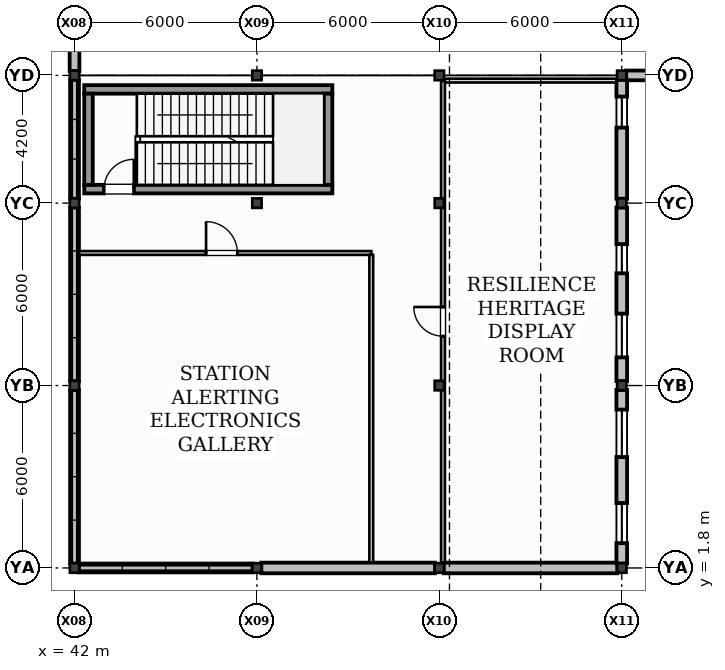
"""IFC4 building model, lengths in metres.
Left out: names, types, materials, properties, quantities, classifications, styles, units other than length and angle.
Written with IfcOpenShell. Run it as: python <this file> out.ifc"""

import sys

from ifc_helpers import new_model, si_unit, direction, frame, frame_2d, origin, origin_2d, place, context, subcontext, project, spatial, rectangle, i_section, extrude, element, fill, save


model = new_model("IFC4")
c1 = context("Model", 3, precision=1e-05, world=origin(), true_north=direction((0.0, 1.0)))
c2 = subcontext(c1, "Body", "Model", "MODEL_VIEW")
j1 = project(units=[si_unit("LENGTHUNIT", "METRE"), si_unit("PLANEANGLEUNIT", "RADIAN")], contexts=[c1])
p1 = place(None, origin())
s1 = spatial("IfcSite", under=j1, at=p1, CompositionType="ELEMENT")
p2 = place(p1, origin())
s2 = spatial("IfcBuilding", under=s1, at=p2, CompositionType="ELEMENT")
p3 = place(p2, frame((0.0, 0.0, 6.0)))
s3 = spatial("IfcBuildingStorey", under=s2, at=p3, CompositionType="ELEMENT", Elevation=6.0)
for number, where, z_axis, x_axis in (
    (1, (42.0, 1.8, 0.0), (0.0, 0.0, 1.0), (1.0, 0.0, 0.0)),
    (2, (42.0, 7.8, 0.0), (0.0, 0.0, 1.0), (1.0, 0.0, 0.0)),
    (3, (42.0, 13.8, 0.0), (0.0, 0.0, 1.0), (1.0, 0.0, 0.0)),
    (4, (42.0, 18.0, 0.0), (0.0, 0.0, 1.0), (1.0, 0.0, 0.0)),
    (5, (48.0, 1.8, 0.0), (0.0, 0.0, 1.0), (1.0, 0.0, 0.0)),
    (6, (48.0, 7.8, 0.0), (0.0, 0.0, 1.0), (1.0, 0.0, 0.0)),
    (7, (48.0, 13.8, 0.0), (0.0, 0.0, 1.0), (1.0, 0.0, 0.0)),
    (8, (48.0, 18.0, 0.0), (0.0, 0.0, 1.0), (1.0, 0.0, 0.0)),
    (9, (54.0, 1.8, 0.0), (0.0, 0.0, 1.0), (1.0, 0.0, 0.0)),
    (10, (54.0, 7.8, 0.0), (0.0, 0.0, 1.0), (1.0, 0.0, 0.0)),
    (11, (54.0, 13.8, 0.0), (0.0, 0.0, 1.0), (1.0, 0.0, 0.0)),
    (12, (54.0, 18.0, 0.0), (0.0, 0.0, 1.0), (1.0, 0.0, 0.0)),
    (13, (60.0, 1.8, 0.0), (0.0, 0.0, 1.0), (1.0, 0.0, 0.0)),
    (14, (60.0, 7.8, 0.0), (0.0, 0.0, 1.0), (1.0, 0.0, 0.0)),
    (15, (60.0, 13.8, 0.0), (0.0, 0.0, 1.0), (1.0, 0.0, 0.0)),
    (16, (60.0, 18.0, 0.0), (0.0, 0.0, 1.0), (1.0, 0.0, 0.0)),
):
    element("IfcColumn", number, at=place(p3, frame(where, z_axis=z_axis, x_axis=x_axis)), inside=s3, PredefinedType="COLUMN", context=c2, shape_type="SweptSolid", body=[
        extrude(i_section(OverallWidth=0.307, OverallDepth=0.314, WebThickness=0.011, FlangeThickness=0.019, at=origin_2d()), origin(), (0.0, 0.0, 1.0), 4.0),
    ])
p4 = place(p3, frame((42.145, 1.8, 0.0), z_axis=(0.0, 0.0, 1.0), x_axis=(1.0, 0.0, 0.0)))
e17 = element("IfcWall", 17, at=p4, inside=s3, PredefinedType="STANDARD", context=c2, shape_type="SweptSolid", body=[
    extrude(rectangle(XDim=5.71, YDim=0.29, at=frame_2d((2.855, 0.0))), origin(), (0.0, 0.0, 1.0), 0.92),
])
for number, where, z_axis, x_axis in (
    (18, (48.145, 1.8, 0.0), (0.0, 0.0, 1.0), (1.0, 0.0, 0.0)),
    (19, (54.145, 1.8, 0.0), (0.0, 0.0, 1.0), (1.0, 0.0, 0.0)),
):
    element("IfcWall", number, at=place(p3, frame(where, z_axis=z_axis, x_axis=x_axis)), inside=s3, PredefinedType="STANDARD", context=c2, shape_type="SweptSolid", body=[
        extrude(rectangle(XDim=5.71, YDim=0.35, at=frame_2d((2.855, 0.0))), origin(), (0.0, 0.0, 1.0), 4.0),
    ])
p5 = place(p3, frame((60.145, 18.0, 0.0), z_axis=(0.0, 0.0, 1.0), x_axis=(1.0, 0.0, 0.0)))
e20 = element("IfcWall", 20, at=p5, inside=s3, PredefinedType="STANDARD", context=c2, shape_type="SweptSolid", body=[
    extrude(rectangle(XDim=5.71, YDim=0.32, at=frame_2d((2.855, 0.0))), origin(), (0.0, 0.0, 1.0), 4.0),
])
p6 = place(p5, frame((0.817, 0.0, 1.42)))
e21 = element("IfcOpeningElement", 21, at=p6, cuts=e20, PredefinedType="OPENING", context=c2, shape_type="SweptSolid", body=[
    extrude(rectangle(XDim=0.9, YDim=0.9, at=frame_2d((0.45, 0.45))), frame((0.0, 0.17, 0.0), z_axis=(0.0, -1.0, 0.0), x_axis=(1.0, 0.0, 0.0)), (0.0, 0.0, 1.0), 0.34),
])
p7 = place(p5, frame((3.777, 0.0, 1.28)))
e22 = element("IfcOpeningElement", 22, at=p7, cuts=e20, PredefinedType="OPENING", context=c2, shape_type="SweptSolid", body=[
    extrude(rectangle(XDim=1.14, YDim=1.14, at=frame_2d((0.57, 0.57))), frame((0.0, 0.17, 0.0), z_axis=(0.0, -1.0, 0.0), x_axis=(1.0, 0.0, 0.0)), (0.0, 0.0, 1.0), 0.34),
])
p8 = place(p3, frame((42.0, 7.655, 0.0), z_axis=(0.0, 0.0, 1.0), x_axis=(0.0, -1.0, 0.0)))
e23 = element("IfcWall", 23, at=p8, inside=s3, PredefinedType="STANDARD", context=c2, shape_type="SweptSolid", body=[
    extrude(rectangle(XDim=5.71, YDim=0.29, at=frame_2d((2.855, 0.0))), origin(), (0.0, 0.0, 1.0), 0.32),
])
p9 = place(p3, frame((42.0, 13.655, 0.0), z_axis=(0.0, 0.0, 1.0), x_axis=(0.0, -1.0, 0.0)))
e24 = element("IfcWall", 24, at=p9, inside=s3, PredefinedType="STANDARD", context=c2, shape_type="SweptSolid", body=[
    extrude(rectangle(XDim=5.71, YDim=0.29, at=frame_2d((2.855, 0.0))), origin(), (0.0, 0.0, 1.0), 0.44),
])
p10 = place(p3, frame((42.0, 17.855, 0.0), z_axis=(0.0, 0.0, 1.0), x_axis=(0.0, -1.0, 0.0)))
e25 = element("IfcWall", 25, at=p10, inside=s3, PredefinedType="STANDARD", context=c2, shape_type="SweptSolid", body=[
    extrude(rectangle(XDim=3.91, YDim=0.29, at=frame_2d((1.955, 0.0))), origin(), (0.0, 0.0, 1.0), 0.56),
])
p11 = place(p3, frame((42.0, 23.855, 0.0), z_axis=(0.0, 0.0, 1.0), x_axis=(0.0, -1.0, 0.0)))
e26 = element("IfcWall", 26, at=p11, inside=s3, PredefinedType="STANDARD", context=c2, shape_type="SweptSolid", body=[
    extrude(rectangle(XDim=5.71, YDim=0.32, at=frame_2d((2.855, 0.0))), origin(), (0.0, 0.0, 1.0), 3.318),
])
p12 = place(p11, frame((0.628, 0.0, 0.86)))
e27 = element("IfcOpeningElement", 27, at=p12, cuts=e26, PredefinedType="OPENING", context=c2, shape_type="SweptSolid", body=[
    extrude(rectangle(XDim=1.44, YDim=1.44, at=frame_2d((0.72, 0.72))), frame((0.0, 0.17, 0.0), z_axis=(0.0, -1.0, 0.0), x_axis=(1.0, 0.0, 0.0)), (0.0, 0.0, 1.0), 0.34),
])
p13 = place(p11, frame((3.894, 0.0, 1.42)))
e28 = element("IfcOpeningElement", 28, at=p13, cuts=e26, PredefinedType="OPENING", context=c2, shape_type="SweptSolid", body=[
    extrude(rectangle(XDim=0.96, YDim=0.96, at=frame_2d((0.48, 0.48))), frame((0.0, 0.17, 0.0), z_axis=(0.0, -1.0, 0.0), x_axis=(1.0, 0.0, 0.0)), (0.0, 0.0, 1.0), 0.34),
])
p14 = place(p3, frame((60.0, 1.945, 0.0), z_axis=(0.0, 0.0, 1.0), x_axis=(0.0, 1.0, 0.0)))
e29 = element("IfcWall", 29, at=p14, inside=s3, PredefinedType="STANDARD", context=c2, shape_type="SweptSolid", body=[
    extrude(rectangle(XDim=5.71, YDim=0.35, at=frame_2d((2.855, 0.0))), origin(), (0.0, 0.0, 1.0), 4.0),
])
p15 = place(p14, frame((0.67, 0.0, 1.18)))
e30 = element("IfcOpeningElement", 30, at=p15, cuts=e29, PredefinedType="OPENING", context=c2, shape_type="SweptSolid", body=[
    extrude(rectangle(XDim=1.32, YDim=1.32, at=frame_2d((0.66, 0.66))), frame((0.0, 0.185, 0.0), z_axis=(0.0, -1.0, 0.0), x_axis=(1.0, 0.0, 0.0)), (0.0, 0.0, 1.0), 0.37),
])
p16 = place(p14, frame((3.504, 0.0, 0.96)))
e31 = element("IfcOpeningElement", 31, at=p16, cuts=e29, PredefinedType="OPENING", context=c2, shape_type="SweptSolid", body=[
    extrude(rectangle(XDim=1.56, YDim=1.56, at=frame_2d((0.78, 0.78))), frame((0.0, 0.185, 0.0), z_axis=(0.0, -1.0, 0.0), x_axis=(1.0, 0.0, 0.0)), (0.0, 0.0, 1.0), 0.37),
])
p17 = place(p3, frame((60.0, 7.945, 0.0), z_axis=(0.0, 0.0, 1.0), x_axis=(0.0, 1.0, 0.0)))
e32 = element("IfcWall", 32, at=p17, inside=s3, PredefinedType="STANDARD", context=c2, shape_type="SweptSolid", body=[
    extrude(rectangle(XDim=5.71, YDim=0.35, at=frame_2d((2.855, 0.0))), origin(), (0.0, 0.0, 1.0), 4.0),
])
p18 = place(p17, frame((0.78, 0.0, 1.42)))
e33 = element("IfcOpeningElement", 33, at=p18, cuts=e32, PredefinedType="OPENING", context=c2, shape_type="SweptSolid", body=[
    extrude(rectangle(XDim=1.44, YDim=1.44, at=frame_2d((0.72, 0.72))), frame((0.0, 0.185, 0.0), z_axis=(0.0, -1.0, 0.0), x_axis=(1.0, 0.0, 0.0)), (0.0, 0.0, 1.0), 0.37),
])
p19 = place(p17, frame((3.546, 0.0, 1.28)))
e34 = element("IfcOpeningElement", 34, at=p19, cuts=e32, PredefinedType="OPENING", context=c2, shape_type="SweptSolid", body=[
    extrude(rectangle(XDim=0.96, YDim=0.96, at=frame_2d((0.48, 0.48))), frame((0.0, 0.185, 0.0), z_axis=(0.0, -1.0, 0.0), x_axis=(1.0, 0.0, 0.0)), (0.0, 0.0, 1.0), 0.37),
])
p20 = place(p3, frame((60.0, 13.945, 0.0), z_axis=(0.0, 0.0, 1.0), x_axis=(0.0, 1.0, 0.0)))
e35 = element("IfcWall", 35, at=p20, inside=s3, PredefinedType="STANDARD", context=c2, shape_type="SweptSolid", body=[
    extrude(rectangle(XDim=3.91, YDim=0.35, at=frame_2d((1.955, 0.0))), origin(), (0.0, 0.0, 1.0), 4.0),
])
p21 = place(p20, frame((2.339, 0.0, 0.86)))
e36 = element("IfcOpeningElement", 36, at=p21, cuts=e35, PredefinedType="OPENING", context=c2, shape_type="SweptSolid", body=[
    extrude(rectangle(XDim=1.02, YDim=1.02, at=frame_2d((0.51, 0.51))), frame((0.0, 0.185, 0.0), z_axis=(0.0, -1.0, 0.0), x_axis=(1.0, 0.0, 0.0)), (0.0, 0.0, 1.0), 0.37),
])
p22 = place(p3, frame((42.32, 14.26, 0.0), z_axis=(0.0, 0.0, 1.0), x_axis=(1.0, 0.0, 0.0)))
e37 = element("IfcWall", 37, at=p22, inside=s3, PredefinedType="SHEAR", context=c2, shape_type="SweptSolid", body=[
    extrude(rectangle(XDim=8.16, YDim=0.28, at=frame_2d((4.08, 0.0))), origin(), (0.0, 0.0, 1.0), 3.75),
])
p23 = place(p22, frame((0.65, 0.0, 0.0)))
e38 = element("IfcOpeningElement", 38, at=p23, cuts=e37, PredefinedType="OPENING", context=c2, shape_type="SweptSolid", body=[
    extrude(rectangle(XDim=0.98, YDim=2.15, at=frame_2d((0.49, 1.075))), frame((0.0, 0.15, 0.0), z_axis=(0.0, -1.0, 0.0), x_axis=(1.0, 0.0, 0.0)), (0.0, 0.0, 1.0), 0.3),
])
p24 = place(p3, frame((50.48, 17.54, 0.0), z_axis=(0.0, 0.0, 1.0), x_axis=(-1.0, 0.0, 0.0)))
e39 = element("IfcWall", 39, at=p24, inside=s3, PredefinedType="SHEAR", context=c2, shape_type="SweptSolid", body=[
    extrude(rectangle(XDim=8.16, YDim=0.28, at=frame_2d((4.08, 0.0))), origin(), (0.0, 0.0, 1.0), 3.75),
])
for number, where, z_axis, x_axis in (
    (40, (42.46, 17.4, 0.0), (0.0, 0.0, 1.0), (0.0, -1.0, 0.0)),
    (41, (50.34, 14.4, 0.0), (0.0, 0.0, 1.0), (0.0, 1.0, 0.0)),
):
    element("IfcWall", number, at=place(p3, frame(where, z_axis=z_axis, x_axis=x_axis)), inside=s3, PredefinedType="SHEAR", context=c2, shape_type="SweptSolid", body=[
        extrude(rectangle(XDim=3.0, YDim=0.28, at=frame_2d((1.5, 0.0))), origin(), (0.0, 0.0, 1.0), 3.75),
    ])
p25 = place(p3, frame((42.145, 12.16, 0.0), z_axis=(0.0, 0.0, 1.0), x_axis=(1.0, 0.0, 0.0)))
e42 = element("IfcWall", 42, at=p25, inside=s3, PredefinedType="PARTITIONING", context=c2, shape_type="SweptSolid", body=[
    extrude(rectangle(XDim=9.617, YDim=0.125, at=frame_2d((4.809, 0.0))), origin(), (0.0, 0.0, 1.0), 3.72),
])
p26 = place(p25, frame((4.182, 0.0, 0.0)))
e43 = element("IfcOpeningElement", 43, at=p26, cuts=e42, PredefinedType="OPENING", context=c2, shape_type="SweptSolid", body=[
    extrude(rectangle(XDim=1.03, YDim=2.15, at=frame_2d((0.515, 1.075))), frame((0.0, 0.073, 0.0), z_axis=(0.0, -1.0, 0.0), x_axis=(1.0, 0.0, 0.0)), (0.0, 0.0, 1.0), 0.145),
])
p27 = place(p3, frame((51.76, 12.097, 0.0), z_axis=(0.0, 0.0, 1.0), x_axis=(0.0, -1.0, 0.0)))
e44 = element("IfcWall", 44, at=p27, inside=s3, PredefinedType="PARTITIONING", context=c2, shape_type="SweptSolid", body=[
    extrude(rectangle(XDim=10.122, YDim=0.125, at=frame_2d((5.061, 0.0))), origin(), (0.0, 0.0, 1.0), 3.72),
])
p28 = place(p3, frame((54.12, 1.975, 0.0), z_axis=(0.0, 0.0, 1.0), x_axis=(0.0, 1.0, 0.0)))
e45 = element("IfcWall", 45, at=p28, inside=s3, PredefinedType="PARTITIONING", context=c2, shape_type="SweptSolid", body=[
    extrude(rectangle(XDim=15.857, YDim=0.125, at=frame_2d((7.929, 0.0))), origin(), (0.0, 0.0, 1.0), 3.72),
])
p29 = place(p28, frame((7.449, 0.0, 0.0)))
e46 = element("IfcOpeningElement", 46, at=p29, cuts=e45, PredefinedType="OPENING", context=c2, shape_type="SweptSolid", body=[
    extrude(rectangle(XDim=0.96, YDim=2.15, at=frame_2d((0.48, 1.075))), frame((0.0, 0.073, 0.0), z_axis=(0.0, -1.0, 0.0), x_axis=(1.0, 0.0, 0.0)), (0.0, 0.0, 1.0), 0.145),
])
p30 = place(p3, frame((54.183, 17.83, 0.0), z_axis=(0.0, 0.0, 1.0), x_axis=(1.0, 0.0, 0.0)))
e47 = element("IfcWall", 47, at=p30, inside=s3, PredefinedType="PARTITIONING", context=c2, shape_type="SweptSolid", body=[
    extrude(rectangle(XDim=5.642, YDim=0.125, at=frame_2d((2.821, 0.0))), origin(), (0.0, 0.0, 1.0), 3.72),
])
p31 = place(p15, origin())
e48 = element("IfcWindow", 48, at=p31, inside=s3, PartitioningType="SINGLE_PANEL", PredefinedType="WINDOW", context=c2, shape_type="SweptSolid", body=[
    extrude(rectangle(XDim=1.32, YDim=1.32, at=frame_2d((0.66, 0.66))), frame((0.0, 0.03, 0.0), z_axis=(0.0, -1.0, 0.0), x_axis=(1.0, 0.0, 0.0)), (0.0, 0.0, 1.0), 0.06),
])
fill(e30, e48)
p32 = place(p16, origin())
e49 = element("IfcWindow", 49, at=p32, inside=s3, PartitioningType="SINGLE_PANEL", PredefinedType="WINDOW", context=c2, shape_type="SweptSolid", body=[
    extrude(rectangle(XDim=1.56, YDim=1.56, at=frame_2d((0.78, 0.78))), frame((0.0, 0.03, 0.0), z_axis=(0.0, -1.0, 0.0), x_axis=(1.0, 0.0, 0.0)), (0.0, 0.0, 1.0), 0.06),
])
fill(e31, e49)
p33 = place(p18, origin())
e50 = element("IfcWindow", 50, at=p33, inside=s3, PartitioningType="SINGLE_PANEL", PredefinedType="WINDOW", context=c2, shape_type="SweptSolid", body=[
    extrude(rectangle(XDim=1.44, YDim=1.44, at=frame_2d((0.72, 0.72))), frame((0.0, 0.03, 0.0), z_axis=(0.0, -1.0, 0.0), x_axis=(1.0, 0.0, 0.0)), (0.0, 0.0, 1.0), 0.06),
])
fill(e33, e50)
p34 = place(p19, origin())
e51 = element("IfcWindow", 51, at=p34, inside=s3, PartitioningType="SINGLE_PANEL", PredefinedType="WINDOW", context=c2, shape_type="SweptSolid", body=[
    extrude(rectangle(XDim=0.96, YDim=0.96, at=frame_2d((0.48, 0.48))), frame((0.0, 0.03, 0.0), z_axis=(0.0, -1.0, 0.0), x_axis=(1.0, 0.0, 0.0)), (0.0, 0.0, 1.0), 0.06),
])
fill(e34, e51)
p35 = place(p21, origin())
e52 = element("IfcWindow", 52, at=p35, inside=s3, PartitioningType="SINGLE_PANEL", PredefinedType="WINDOW", context=c2, shape_type="SweptSolid", body=[
    extrude(rectangle(XDim=1.02, YDim=1.02, at=frame_2d((0.51, 0.51))), frame((0.0, 0.03, 0.0), z_axis=(0.0, -1.0, 0.0), x_axis=(1.0, 0.0, 0.0)), (0.0, 0.0, 1.0), 0.06),
])
fill(e36, e52)
p36 = place(p23, origin())
e53 = element("IfcDoor", 53, at=p36, inside=s3, OperationType="SINGLE_SWING_RIGHT", PredefinedType="DOOR", context=c2, shape_type="SweptSolid", body=[
    extrude(rectangle(XDim=0.98, YDim=2.15, at=frame_2d((0.49, 1.075))), frame((0.0, 0.025, 0.0), z_axis=(0.0, -1.0, 0.0), x_axis=(1.0, 0.0, 0.0)), (0.0, 0.0, 1.0), 0.05),
])
fill(e38, e53)
p37 = place(p26, frame((1.03, 0.0, 0.0), z_axis=(0.0, 0.0, 1.0), x_axis=(-1.0, 0.0, 0.0)))
e54 = element("IfcDoor", 54, at=p37, inside=s3, OperationType="SINGLE_SWING_LEFT", PredefinedType="DOOR", context=c2, shape_type="SweptSolid", body=[
    extrude(rectangle(XDim=1.03, YDim=2.15, at=frame_2d((0.515, 1.075))), frame((0.0, 0.025, 0.0), z_axis=(0.0, -1.0, 0.0), x_axis=(1.0, 0.0, 0.0)), (0.0, 0.0, 1.0), 0.05),
])
fill(e43, e54)
p38 = place(p29, frame((0.96, 0.0, 0.0), z_axis=(0.0, 0.0, 1.0), x_axis=(-1.0, 0.0, 0.0)))
e55 = element("IfcDoor", 55, at=p38, inside=s3, OperationType="SINGLE_SWING_RIGHT", PredefinedType="DOOR", context=c2, shape_type="SweptSolid", body=[
    extrude(rectangle(XDim=0.96, YDim=2.15, at=frame_2d((0.48, 1.075))), frame((0.0, 0.025, 0.0), z_axis=(0.0, -1.0, 0.0), x_axis=(1.0, 0.0, 0.0)), (0.0, 0.0, 1.0), 0.05),
])
fill(e46, e55)
save(model, sys.argv[1])
